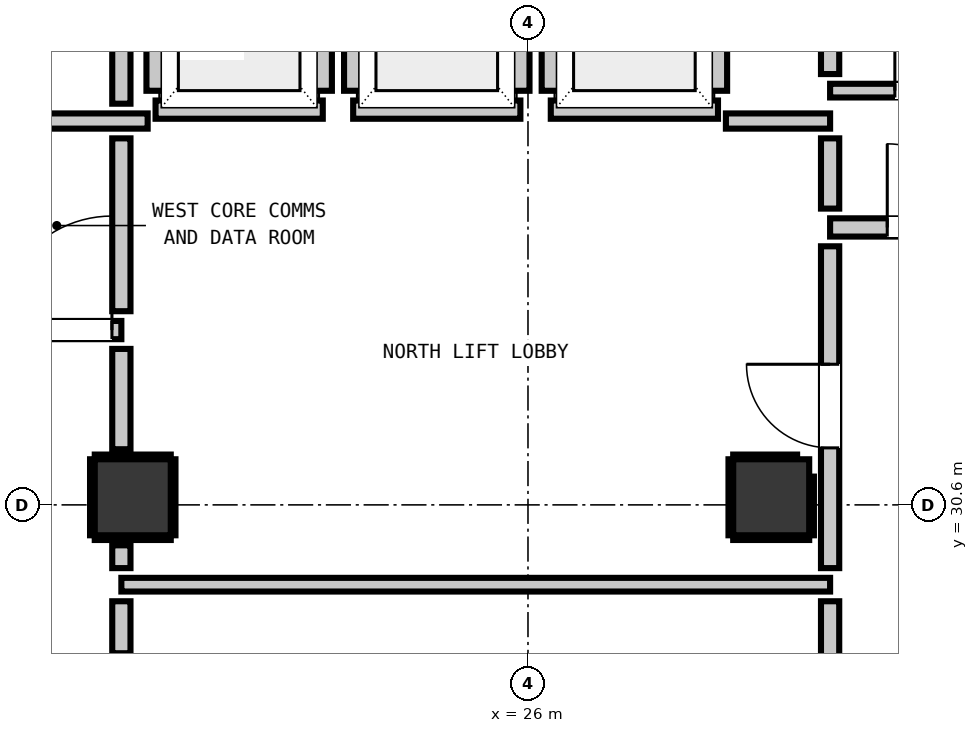
"""IFC4 building model, lengths in metres.
Left out: names, types, materials, properties, quantities, classifications, styles, units other than length and angle.
Written with IfcOpenShell. Run it as: python <this file> out.ifc"""

import sys

from ifc_helpers import new_model, si_unit, direction, frame, frame_2d, origin, origin_2d, place, context, subcontext, project, spatial, rectangle, extrude, element, fill, save


model = new_model("IFC4")
c1 = context("Model", 3, precision=1e-05, world=origin(), true_north=direction((0.0, 1.0)))
c2 = subcontext(c1, "Body", "Model", "MODEL_VIEW")
j1 = project(units=[si_unit("LENGTHUNIT", "METRE"), si_unit("PLANEANGLEUNIT", "RADIAN")], contexts=[c1])
p1 = place(None, origin())
s1 = spatial("IfcSite", under=j1, at=p1, CompositionType="ELEMENT")
p2 = place(p1, origin())
s2 = spatial("IfcBuilding", under=s1, at=p2, CompositionType="ELEMENT")
p3 = place(p2, frame((0.0, 0.0, 48.56)))
s3 = spatial("IfcBuildingStorey", under=s2, at=p3, CompositionType="ELEMENT", Elevation=48.56)
for number, where, z_axis, x_axis in (
    (1, (20.8, 30.7, 0.0), (0.0, 0.0, 1.0), (1.0, 0.0, 0.0)),
    (2, (29.2, 30.7, 0.0), (0.0, 0.0, 1.0), (1.0, 0.0, 0.0)),
):
    element("IfcColumn", number, at=place(p3, frame(where, z_axis=z_axis, x_axis=x_axis)), inside=s3, PredefinedType="COLUMN", context=c2, shape_type="SweptSolid", body=[
        extrude(rectangle(XDim=1.0, YDim=1.0, at=origin_2d()), origin(), (0.0, 0.0, 1.0), 3.32),
    ])
p4 = place(p3, frame((21.1, 35.8, 0.0), z_axis=(0.0, 0.0, 1.0), x_axis=(1.0, 0.0, 0.0)))
e3 = element("IfcWall", 3, at=p4, inside=s3, PredefinedType="PARTITIONING", context=c2, shape_type="SweptSolid", body=[
    extrude(rectangle(XDim=2.2, YDim=0.24, at=frame_2d((1.1, 0.0))), origin(), (0.0, 0.0, 1.0), 3.06),
])
p5 = place(p3, frame((21.1, 36.048, 0.0), z_axis=(0.0, 0.0, 1.0), x_axis=(0.0, 1.0, 0.0)))
e4 = element("IfcWall", 4, at=p5, inside=s3, PredefinedType="PARTITIONING", context=c2, shape_type="SweptSolid", body=[
    extrude(rectangle(XDim=2.104, YDim=0.24, at=frame_2d((1.052, 0.0))), origin(), (0.0, 0.0, 1.0), 2.295),
])
p6 = place(p3, frame((23.3, 36.048, 0.0), z_axis=(0.0, 0.0, 1.0), x_axis=(0.0, 1.0, 0.0)))
e5 = element("IfcWall", 5, at=p6, inside=s3, PredefinedType="PARTITIONING", context=c2, shape_type="SweptSolid", body=[
    extrude(rectangle(XDim=2.104, YDim=0.24, at=frame_2d((1.052, 0.0))), origin(), (0.0, 0.0, 1.0), 3.06),
])
p7 = place(p3, frame((23.7, 35.8, 0.0), z_axis=(0.0, 0.0, 1.0), x_axis=(1.0, 0.0, 0.0)))
e6 = element("IfcWall", 6, at=p7, inside=s3, PredefinedType="PARTITIONING", context=c2, shape_type="SweptSolid", body=[
    extrude(rectangle(XDim=2.2, YDim=0.24, at=frame_2d((1.1, 0.0))), origin(), (0.0, 0.0, 1.0), 3.06),
])
for number, where, z_axis, x_axis in (
    (7, (23.7, 36.048, 0.0), (0.0, 0.0, 1.0), (0.0, 1.0, 0.0)),
    (8, (25.9, 36.048, 0.0), (0.0, 0.0, 1.0), (0.0, 1.0, 0.0)),
):
    element("IfcWall", number, at=place(p3, frame(where, z_axis=z_axis, x_axis=x_axis)), inside=s3, PredefinedType="PARTITIONING", context=c2, shape_type="SweptSolid", body=[
        extrude(rectangle(XDim=2.104, YDim=0.24, at=frame_2d((1.052, 0.0))), origin(), (0.0, 0.0, 1.0), 3.06),
    ])
p8 = place(p3, frame((26.3, 35.8, 0.0), z_axis=(0.0, 0.0, 1.0), x_axis=(1.0, 0.0, 0.0)))
e9 = element("IfcWall", 9, at=p8, inside=s3, PredefinedType="PARTITIONING", context=c2, shape_type="SweptSolid", body=[
    extrude(rectangle(XDim=2.2, YDim=0.24, at=frame_2d((1.1, 0.0))), origin(), (0.0, 0.0, 1.0), 3.06),
])
for number, where, z_axis, x_axis in (
    (10, (26.3, 36.048, 0.0), (0.0, 0.0, 1.0), (0.0, 1.0, 0.0)),
    (11, (28.5, 36.048, 0.0), (0.0, 0.0, 1.0), (0.0, 1.0, 0.0)),
):
    element("IfcWall", number, at=place(p3, frame(where, z_axis=z_axis, x_axis=x_axis)), inside=s3, PredefinedType="PARTITIONING", context=c2, shape_type="SweptSolid", body=[
        extrude(rectangle(XDim=2.104, YDim=0.24, at=frame_2d((1.052, 0.0))), origin(), (0.0, 0.0, 1.0), 3.06),
    ])
p9 = place(p3, frame((17.45, 32.9, 0.0), z_axis=(0.0, 0.0, 1.0), x_axis=(1.0, 0.0, 0.0)))
e12 = element("IfcWall", 12, at=p9, inside=s3, PredefinedType="PARTITIONING", context=c2, shape_type="SweptSolid", body=[
    extrude(rectangle(XDim=3.2, YDim=0.24, at=frame_2d((1.6, 0.0))), origin(), (0.0, 0.0, 1.0), 3.06),
])
p10 = place(p9, frame((0.159, 0.0, 0.0)))
e13 = element("IfcOpeningElement", 13, at=p10, cuts=e12, PredefinedType="OPENING", context=c2, shape_type="SweptSolid", body=[
    extrude(rectangle(XDim=1.1, YDim=2.15, at=frame_2d((0.55, 1.075))), frame((0.0, 0.13, 0.0), z_axis=(0.0, -1.0, 0.0), x_axis=(1.0, 0.0, 0.0)), (0.0, 0.0, 1.0), 0.26),
])
p11 = place(p9, frame((1.576, 0.0, 0.0)))
e14 = element("IfcOpeningElement", 14, at=p11, cuts=e12, PredefinedType="OPENING", context=c2, shape_type="SweptSolid", body=[
    extrude(rectangle(XDim=1.5, YDim=2.15, at=frame_2d((0.75, 1.075))), frame((0.0, 0.13, 0.0), z_axis=(0.0, -1.0, 0.0), x_axis=(1.0, 0.0, 0.0)), (0.0, 0.0, 1.0), 0.26),
])
p12 = place(p3, frame((29.975, 34.25, 0.0), z_axis=(0.0, 0.0, 1.0), x_axis=(1.0, 0.0, 0.0)))
e15 = element("IfcWall", 15, at=p12, inside=s3, PredefinedType="PARTITIONING", context=c2, shape_type="SweptSolid", body=[
    extrude(rectangle(XDim=2.475, YDim=0.24, at=frame_2d((1.237, 0.0))), origin(), (0.0, 0.0, 1.0), 3.06),
])
p13 = place(p12, frame((0.752, 0.0, 0.0)))
e16 = element("IfcOpeningElement", 16, at=p13, cuts=e15, PredefinedType="OPENING", context=c2, shape_type="SweptSolid", body=[
    extrude(rectangle(XDim=1.1, YDim=2.15, at=frame_2d((0.55, 1.075))), frame((0.0, 0.13, 0.0), z_axis=(0.0, -1.0, 0.0), x_axis=(1.0, 0.0, 0.0)), (0.0, 0.0, 1.0), 0.26),
])
p14 = place(p3, frame((18.95, 35.65, 0.0), z_axis=(0.0, 0.0, 1.0), x_axis=(1.0, 0.0, 0.0)))
e17 = element("IfcWall", 17, at=p14, inside=s3, PredefinedType="PARTITIONING", context=c2, shape_type="SweptSolid", body=[
    extrude(rectangle(XDim=2.046, YDim=0.2, at=frame_2d((1.023, 0.0))), origin(), (0.0, 0.0, 1.0), 3.06),
])
p15 = place(p3, frame((28.604, 35.65, 0.0), z_axis=(0.0, 0.0, 1.0), x_axis=(1.0, 0.0, 0.0)))
e18 = element("IfcWall", 18, at=p15, inside=s3, PredefinedType="PARTITIONING", context=c2, shape_type="SweptSolid", body=[
    extrude(rectangle(XDim=1.371, YDim=0.2, at=frame_2d((0.686, 0.0))), origin(), (0.0, 0.0, 1.0), 3.06),
])
p16 = place(p3, frame((20.65, 29.55, 0.0), z_axis=(0.0, 0.0, 1.0), x_axis=(1.0, 0.0, 0.0)))
e19 = element("IfcWall", 19, at=p16, inside=s3, PredefinedType="PARTITIONING", context=c2, shape_type="SweptSolid", body=[
    extrude(rectangle(XDim=9.325, YDim=0.18, at=frame_2d((4.663, 0.0))), origin(), (0.0, 0.0, 1.0), 3.06),
])
p17 = place(p3, frame((29.975, 36.05, 0.0), z_axis=(0.0, 0.0, 1.0), x_axis=(1.0, 0.0, 0.0)))
e20 = element("IfcWall", 20, at=p17, inside=s3, PredefinedType="PARTITIONING", context=c2, shape_type="SweptSolid", body=[
    extrude(rectangle(XDim=2.505, YDim=0.18, at=frame_2d((1.252, 0.0))), origin(), (0.0, 0.0, 1.0), 3.06),
])
p18 = place(p17, frame((0.852, 0.0, 0.0)))
e21 = element("IfcOpeningElement", 21, at=p18, cuts=e20, PredefinedType="OPENING", context=c2, shape_type="SweptSolid", body=[
    extrude(rectangle(XDim=0.9, YDim=2.1, at=frame_2d((0.45, 1.05))), frame((0.0, 0.1, 0.0), z_axis=(0.0, -1.0, 0.0), x_axis=(1.0, 0.0, 0.0)), (0.0, 0.0, 1.0), 0.2),
])
p19 = place(p3, frame((20.65, 28.648, 0.0), z_axis=(0.0, 0.0, 1.0), x_axis=(0.0, 1.0, 0.0)))
e22 = element("IfcWall", 22, at=p19, inside=s3, PredefinedType="PARTITIONING", context=c2, shape_type="SweptSolid", body=[
    extrude(rectangle(XDim=0.684, YDim=0.24, at=frame_2d((0.342, 0.0))), origin(), (0.0, 0.0, 1.0), 2.295),
])
p20 = place(p3, frame((20.65, 29.768, 0.0), z_axis=(0.0, 0.0, 1.0), x_axis=(0.0, 1.0, 0.0)))
e23 = element("IfcWall", 23, at=p20, inside=s3, PredefinedType="PARTITIONING", context=c2, shape_type="SweptSolid", body=[
    extrude(rectangle(XDim=0.3, YDim=0.24, at=frame_2d((0.15, 0.0))), origin(), (0.0, 0.0, 1.0), 2.295),
])
p21 = place(p3, frame((20.65, 31.332, 0.0), z_axis=(0.0, 0.0, 1.0), x_axis=(0.0, 1.0, 0.0)))
e24 = element("IfcWall", 24, at=p21, inside=s3, PredefinedType="PARTITIONING", context=c2, shape_type="SweptSolid", body=[
    extrude(rectangle(XDim=1.32, YDim=0.24, at=frame_2d((0.66, 0.0))), origin(), (0.0, 0.0, 1.0), 2.295),
])
p22 = place(p3, frame((20.65, 33.148, 0.0), z_axis=(0.0, 0.0, 1.0), x_axis=(0.0, 1.0, 0.0)))
e25 = element("IfcWall", 25, at=p22, inside=s3, PredefinedType="PARTITIONING", context=c2, shape_type="SweptSolid", body=[
    extrude(rectangle(XDim=2.274, YDim=0.24, at=frame_2d((1.137, 0.0))), origin(), (0.0, 0.0, 1.0), 2.295),
])
p23 = place(p3, frame((20.65, 35.878, 0.0), z_axis=(0.0, 0.0, 1.0), x_axis=(0.0, 1.0, 0.0)))
e26 = element("IfcWall", 26, at=p23, inside=s3, PredefinedType="PARTITIONING", context=c2, shape_type="SweptSolid", body=[
    extrude(rectangle(XDim=2.674, YDim=0.24, at=frame_2d((1.337, 0.0))), origin(), (0.0, 0.0, 1.0), 2.295),
])
p24 = place(p3, frame((29.975, 25.648, 0.0), z_axis=(0.0, 0.0, 1.0), x_axis=(0.0, 1.0, 0.0)))
e27 = element("IfcWall", 27, at=p24, inside=s3, PredefinedType="PARTITIONING", context=c2, shape_type="SweptSolid", body=[
    extrude(rectangle(XDim=3.684, YDim=0.24, at=frame_2d((1.842, 0.0))), origin(), (0.0, 0.0, 1.0), 3.06),
])
p25 = place(p3, frame((29.975, 29.768, 0.0), z_axis=(0.0, 0.0, 1.0), x_axis=(0.0, 1.0, 0.0)))
e28 = element("IfcWall", 28, at=p25, inside=s3, PredefinedType="PARTITIONING", context=c2, shape_type="SweptSolid", body=[
    extrude(rectangle(XDim=4.234, YDim=0.24, at=frame_2d((2.117, 0.0))), origin(), (0.0, 0.0, 1.0), 3.06),
])
p26 = place(p25, frame((1.582, 0.0, 0.0)))
e29 = element("IfcOpeningElement", 29, at=p26, cuts=e28, PredefinedType="OPENING", context=c2, shape_type="SweptSolid", body=[
    extrude(rectangle(XDim=1.1, YDim=2.15, at=frame_2d((0.55, 1.075))), frame((0.0, 0.13, 0.0), z_axis=(0.0, -1.0, 0.0), x_axis=(1.0, 0.0, 0.0)), (0.0, 0.0, 1.0), 0.26),
])
p27 = place(p3, frame((29.975, 34.498, 0.0), z_axis=(0.0, 0.0, 1.0), x_axis=(0.0, 1.0, 0.0)))
e30 = element("IfcWall", 30, at=p27, inside=s3, PredefinedType="PARTITIONING", context=c2, shape_type="SweptSolid", body=[
    extrude(rectangle(XDim=0.924, YDim=0.24, at=frame_2d((0.462, 0.0))), origin(), (0.0, 0.0, 1.0), 3.06),
])
p28 = place(p3, frame((29.975, 36.268, 0.0), z_axis=(0.0, 0.0, 1.0), x_axis=(0.0, 1.0, 0.0)))
e31 = element("IfcWall", 31, at=p28, inside=s3, PredefinedType="PARTITIONING", context=c2, shape_type="SweptSolid", body=[
    extrude(rectangle(XDim=2.284, YDim=0.24, at=frame_2d((1.142, 0.0))), origin(), (0.0, 0.0, 1.0), 3.06),
])
for number, where, z_axis, x_axis in (
    (32, (20.3, 30.168, 0.0), (0.0, 0.0, 1.0), (1.0, 0.0, 0.0)),
    (33, (20.3, 31.232, 0.0), (0.0, 0.0, 1.0), (1.0, 0.0, 0.0)),
    (34, (20.268, 30.2, 0.0), (0.0, 0.0, 1.0), (0.0, 1.0, 0.0)),
    (35, (21.332, 30.2, 0.0), (0.0, 0.0, 1.0), (0.0, 1.0, 0.0)),
    (36, (28.7, 30.168, 0.0), (0.0, 0.0, 1.0), (1.0, 0.0, 0.0)),
):
    element("IfcWall", number, at=place(p3, frame(where, z_axis=z_axis, x_axis=x_axis)), inside=s3, PredefinedType="PARTITIONING", context=c2, shape_type="SweptSolid", body=[
        extrude(rectangle(XDim=1.0, YDim=0.06, at=frame_2d((0.5, 0.0))), origin(), (0.0, 0.0, 1.0), 1.45),
    ])
p29 = place(p3, frame((28.7, 31.232, 0.0), z_axis=(0.0, 0.0, 1.0), x_axis=(1.0, 0.0, 0.0)))
e37 = element("IfcWall", 37, at=p29, inside=s3, PredefinedType="PARTITIONING", context=c2, shape_type="SweptSolid", body=[
    extrude(rectangle(XDim=0.841, YDim=0.06, at=frame_2d((0.42, 0.0))), origin(), (0.0, 0.0, 1.0), 1.45),
])
p30 = place(p3, frame((28.668, 30.2, 0.0), z_axis=(0.0, 0.0, 1.0), x_axis=(0.0, 1.0, 0.0)))
e38 = element("IfcWall", 38, at=p30, inside=s3, PredefinedType="PARTITIONING", context=c2, shape_type="SweptSolid", body=[
    extrude(rectangle(XDim=1.0, YDim=0.06, at=frame_2d((0.5, 0.0))), origin(), (0.0, 0.0, 1.0), 1.45),
])
p31 = place(p3, frame((29.732, 30.2, 0.0), z_axis=(0.0, 0.0, 1.0), x_axis=(0.0, 1.0, 0.0)))
e39 = element("IfcWall", 39, at=p31, inside=s3, PredefinedType="PARTITIONING", context=c2, shape_type="SweptSolid", body=[
    extrude(rectangle(XDim=0.772, YDim=0.06, at=frame_2d((0.386, 0.0))), origin(), (0.0, 0.0, 1.0), 1.45),
])
p32 = place(p26, origin())
e40 = element("IfcDoor", 40, at=p32, inside=s3, OperationType="SINGLE_SWING_RIGHT", PredefinedType="DOOR", context=c2, shape_type="SweptSolid", body=[
    extrude(rectangle(XDim=1.1, YDim=2.15, at=frame_2d((0.55, 1.075))), frame((0.0, 0.025, 0.0), z_axis=(0.0, -1.0, 0.0), x_axis=(1.0, 0.0, 0.0)), (0.0, 0.0, 1.0), 0.05),
])
fill(e29, e40)
p33 = place(p13, origin())
e41 = element("IfcDoor", 41, at=p33, inside=s3, OperationType="SINGLE_SWING_LEFT", PredefinedType="DOOR", context=c2, shape_type="SweptSolid", body=[
    extrude(rectangle(XDim=1.1, YDim=2.15, at=frame_2d((0.55, 1.075))), frame((0.0, 0.025, 0.0), z_axis=(0.0, -1.0, 0.0), x_axis=(1.0, 0.0, 0.0)), (0.0, 0.0, 1.0), 0.05),
])
fill(e16, e41)
p34 = place(p11, origin())
e42 = element("IfcDoor", 42, at=p34, inside=s3, OperationType="SINGLE_SWING_RIGHT", PredefinedType="DOOR", context=c2, shape_type="SweptSolid", body=[
    extrude(rectangle(XDim=1.5, YDim=2.15, at=frame_2d((0.75, 1.075))), frame((0.0, 0.025, 0.0), z_axis=(0.0, -1.0, 0.0), x_axis=(1.0, 0.0, 0.0)), (0.0, 0.0, 1.0), 0.05),
])
fill(e14, e42)
p35 = place(p18, origin())
e43 = element("IfcDoor", 43, at=p35, inside=s3, OperationType="SINGLE_SWING_LEFT", PredefinedType="DOOR", context=c2, shape_type="SweptSolid", body=[
    extrude(rectangle(XDim=0.9, YDim=2.1, at=frame_2d((0.45, 1.05))), frame((0.0, 0.025, 0.0), z_axis=(0.0, -1.0, 0.0), x_axis=(1.0, 0.0, 0.0)), (0.0, 0.0, 1.0), 0.05),
])
fill(e21, e43)
save(model, sys.argv[1])
